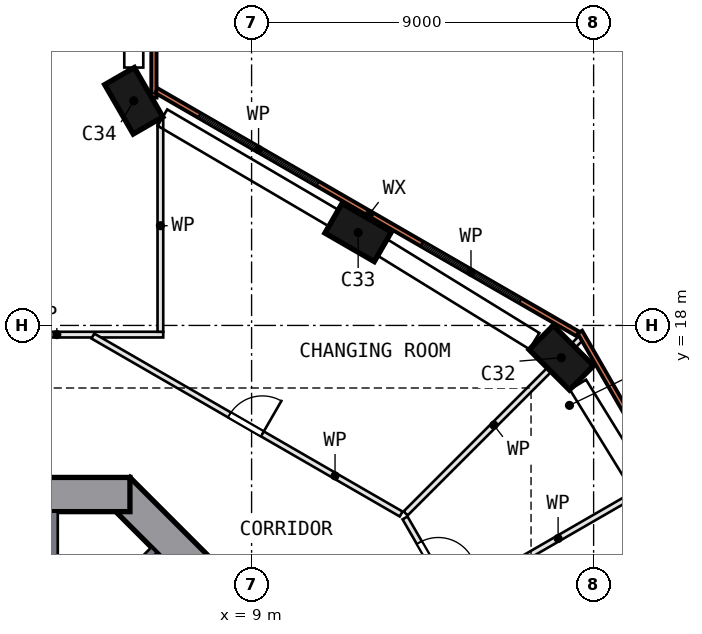
"""IFC4 building model, lengths in metres.
Left out: names, types, materials, properties, quantities, classifications, styles, units other than length and angle.
Written with IfcOpenShell. Run it as: python <this file> out.ifc"""

import sys

from ifc_helpers import new_model, si_unit, direction, frame, frame_2d, origin, origin_2d, place, context, subcontext, project, spatial, polyline, rectangle, outline, extrude, element, fill, save


model = new_model("IFC4")
c1 = context("Model", 3, precision=1e-05, world=origin(), true_north=direction((0.0, 1.0)))
c2 = subcontext(c1, "Body", "Model", "MODEL_VIEW")
j1 = project(units=[si_unit("LENGTHUNIT", "METRE"), si_unit("PLANEANGLEUNIT", "RADIAN")], contexts=[c1])
p1 = place(None, origin())
s1 = spatial("IfcSite", under=j1, at=p1, CompositionType="ELEMENT")
p2 = place(p1, origin())
s2 = spatial("IfcBuilding", under=s1, at=p2, CompositionType="ELEMENT")
p3 = place(p2, frame((0.0, 0.0, 23.5)))
s3 = spatial("IfcBuildingStorey", under=s2, at=p3, CompositionType="ELEMENT", Elevation=23.5)
for number, where, z_axis, x_axis in (
    (1, (17.151, 17.151, 0.0), (0.0, 0.0, 1.0), (0.707, -0.707, 0.0)),
    (2, (11.804, 20.445, 0.0), (0.0, 0.0, 1.0), (-0.866, 0.5, 0.0)),
    (3, (5.9, 23.912, 0.0), (0.0, 0.0, 1.0), (0.5, -0.866, 0.0)),
):
    element("IfcColumn", number, at=place(p3, frame(where, z_axis=z_axis, x_axis=x_axis)), inside=s3, PredefinedType="COLUMN", context=c2, shape_type="SweptSolid", body=[
        extrude(rectangle(XDim=1.5, YDim=0.9, at=origin_2d()), origin(), (0.0, 0.0, 1.0), 4.0),
    ])
p4 = place(p3, frame((13.682, 5.481, 0.0), z_axis=(0.0, 0.0, 1.0), x_axis=(-0.707106781, 0.707106781, 0.0)))
e4 = element("IfcWall", 4, at=p4, inside=s3, PredefinedType="SHEAR", context=c2, shape_type="SweptSolid", body=[
    extrude(rectangle(XDim=11.598, YDim=0.9, at=frame_2d((5.799, 0.0))), origin(), (0.0, 0.0, 1.0), 4.5),
])
p5 = place(p4, frame((2.099, 0.0, 0.0)))
e5 = element("IfcOpeningElement", 5, at=p5, cuts=e4, PredefinedType="OPENING", context=c2, shape_type="SweptSolid", body=[
    extrude(rectangle(XDim=1.2, YDim=2.1, at=frame_2d((0.6, 1.05))), frame((0.0, 0.46, 0.0), z_axis=(0.0, -1.0, 0.0), x_axis=(1.0, 0.0, 0.0)), (0.0, 0.0, 1.0), 0.92),
])
p6 = place(p3, frame((5.799, 13.55, 0.0), z_axis=(0.0, 0.0, 1.0), x_axis=(-1.0, 0.0, 0.0)))
e6 = element("IfcWall", 6, at=p6, inside=s3, PredefinedType="SHEAR", context=c2, shape_type="SweptSolid", body=[
    extrude(rectangle(XDim=11.598, YDim=0.9, at=frame_2d((5.799, 0.0))), origin(), (0.0, 0.0, 1.0), 4.5),
])
p7 = place(p6, frame((4.899, 0.0, 0.0)))
e7 = element("IfcOpeningElement", 7, at=p7, cuts=e6, PredefinedType="OPENING", context=c2, shape_type="SweptSolid", body=[
    extrude(rectangle(XDim=1.8, YDim=2.1, at=frame_2d((0.9, 1.05))), frame((0.0, 0.46, 0.0), z_axis=(0.0, -1.0, 0.0), x_axis=(1.0, 0.0, 0.0)), (0.0, 0.0, 1.0), 0.92),
])
p8 = place(p3, frame((6.43, 23.995, 0.0), z_axis=(0.0, 0.0, 1.0), x_axis=(0.0, 1.0, 0.0)))
e8 = element("IfcWall", 8, at=p8, inside=s3, PredefinedType="SOLIDWALL", context=c2, shape_type="SweptSolid", body=[
    extrude(rectangle(XDim=17.405, YDim=0.14, at=frame_2d((8.702, 0.0))), origin(), (0.0, 0.0, 1.0), 4.0),
])
p9 = place(p8, frame((1.634, 0.0, 0.9)))
e9 = element("IfcOpeningElement", 9, at=p9, cuts=e8, PredefinedType="OPENING", context=c2, shape_type="SweptSolid", body=[
    extrude(rectangle(XDim=3.0, YDim=2.4, at=frame_2d((1.5, 1.2))), frame((0.0, 0.08, 0.0), z_axis=(0.0, -1.0, 0.0), x_axis=(1.0, 0.0, 0.0)), (0.0, 0.0, 1.0), 0.16),
])
p10 = place(p8, frame((7.334, 0.0, 0.9)))
e10 = element("IfcOpeningElement", 10, at=p10, cuts=e8, PredefinedType="OPENING", context=c2, shape_type="SweptSolid", body=[
    extrude(rectangle(XDim=3.0, YDim=2.4, at=frame_2d((1.5, 1.2))), frame((0.0, 0.08, 0.0), z_axis=(0.0, -1.0, 0.0), x_axis=(1.0, 0.0, 0.0)), (0.0, 0.0, 1.0), 0.16),
])
p11 = place(p3, frame((24.118, 6.603, 0.0), z_axis=(0.0, 0.0, 1.0), x_axis=(-0.499997984, 0.866026568, 0.0)))
e11 = element("IfcWall", 11, at=p11, inside=s3, PredefinedType="SOLIDWALL", context=c2, shape_type="SweptSolid", body=[
    extrude(rectangle(XDim=12.962, YDim=0.14, at=frame_2d((6.481, 0.0))), origin(), (0.0, 0.0, 1.0), 4.0),
])
p12 = place(p3, frame((17.586, 17.777, 0.0), z_axis=(0.0, 0.0, 1.0), x_axis=(-0.866023287, 0.500003667, 0.0)))
e12 = element("IfcWall", 12, at=p12, inside=s3, PredefinedType="SOLIDWALL", context=c2, shape_type="SweptSolid", body=[
    extrude(rectangle(XDim=12.801, YDim=0.14, at=frame_2d((6.4, 0.0))), origin(), (0.0, 0.0, 1.0), 4.0),
])
p13 = place(p12, frame((1.748, 0.0, 0.9)))
e13 = element("IfcOpeningElement", 13, at=p13, cuts=e12, PredefinedType="OPENING", context=c2, shape_type="SweptSolid", body=[
    extrude(rectangle(XDim=3.0, YDim=2.4, at=frame_2d((1.5, 1.2))), frame((0.0, 0.08, 0.0), z_axis=(0.0, -1.0, 0.0), x_axis=(1.0, 0.0, 0.0)), (0.0, 0.0, 1.0), 0.16),
])
p14 = place(p12, frame((7.902, 0.0, 0.9)))
e14 = element("IfcOpeningElement", 14, at=p14, cuts=e12, PredefinedType="OPENING", context=c2, shape_type="SweptSolid", body=[
    extrude(rectangle(XDim=3.6, YDim=2.4, at=frame_2d((1.8, 1.2))), frame((0.0, 0.08, 0.0), z_axis=(0.0, -1.0, 0.0), x_axis=(1.0, 0.0, 0.0)), (0.0, 0.0, 1.0), 0.16),
])
p15 = place(p3, origin())
e15 = element("IfcWall", 15, at=p15, inside=s3, PredefinedType="SOLIDWALL", context=c2, shape_type="SweptSolid", body=[
    extrude(outline(polyline([(3.9, 13.1), (3.9, 10.9), (3.7, 10.9), (3.7, 12.9), (1.4, 12.9), (1.4, 10.9), (1.2, 10.9), (1.2, 13.1), (3.9, 13.1)])), origin(), (0.0, 0.0, 1.0), 4.0),
])
p16 = place(p3, frame((3.677, 9.334, 0.0), z_axis=(0.0, 0.0, 1.0), x_axis=(0.707106781, 0.707106781, 0.0)))
e16 = element("IfcWall", 16, at=p16, inside=s3, PredefinedType="SOLIDWALL", context=c2, shape_type="SweptSolid", body=[
    extrude(rectangle(XDim=3.9, YDim=0.2, at=frame_2d((1.95, 0.0))), origin(), (0.0, 0.0, 1.0), 4.0),
])
p17 = place(p3, frame((6.675, 17.758, 0.0), z_axis=(0.0, 0.0, 1.0), x_axis=(-1.0, 0.0, 0.0)))
e17 = element("IfcWall", 17, at=p17, inside=s3, PredefinedType="PARTITIONING", context=c2, shape_type="SweptSolid", body=[
    extrude(rectangle(XDim=13.35, YDim=0.15, at=frame_2d((6.675, 0.0))), origin(), (0.0, 0.0, 1.0), 4.0),
])
p18 = place(p17, frame((5.8, 0.0, 0.0)))
e18 = element("IfcOpeningElement", 18, at=p18, cuts=e17, PredefinedType="OPENING", context=c2, shape_type="SweptSolid", body=[
    extrude(rectangle(XDim=1.8, YDim=2.1, at=frame_2d((0.9, 1.05))), frame((0.0, 0.085, 0.0), z_axis=(0.0, -1.0, 0.0), x_axis=(1.0, 0.0, 0.0)), (0.0, 0.0, 1.0), 0.17),
])
p19 = place(p3, frame((4.823, 17.721, 0.0), z_axis=(0.0, 0.0, 1.0), x_axis=(0.866037142, -0.499979668, 0.0)))
e19 = element("IfcWall", 19, at=p19, inside=s3, PredefinedType="PARTITIONING", context=c2, shape_type="SweptSolid", body=[
    extrude(rectangle(XDim=9.367, YDim=0.15, at=frame_2d((4.683, 0.0))), origin(), (0.0, 0.0, 1.0), 4.0),
])
p20 = place(p19, frame((4.15, 0.0, 0.0)))
e20 = element("IfcOpeningElement", 20, at=p20, cuts=e19, PredefinedType="OPENING", context=c2, shape_type="SweptSolid", body=[
    extrude(rectangle(XDim=1.0, YDim=2.1, at=frame_2d((0.5, 1.05))), frame((0.0, 0.085, 0.0), z_axis=(0.0, -1.0, 0.0), x_axis=(1.0, 0.0, 0.0)), (0.0, 0.0, 1.0), 0.17),
])
p21 = place(p3, frame((6.6, 17.833, 0.0), z_axis=(0.0, 0.0, 1.0), x_axis=(0.0, 1.0, 0.0)))
e21 = element("IfcWall", 21, at=p21, inside=s3, PredefinedType="PARTITIONING", context=c2, shape_type="SweptSolid", body=[
    extrude(rectangle(XDim=5.582, YDim=0.15, at=frame_2d((2.791, 0.0))), origin(), (0.0, 0.0, 1.0), 4.0),
])
p22 = place(p3, frame((13.038, 12.935, 0.0), z_axis=(0.0, 0.0, 1.0), x_axis=(0.499933044, -0.866064057, 0.0)))
e22 = element("IfcWall", 22, at=p22, inside=s3, PredefinedType="PARTITIONING", context=c2, shape_type="SweptSolid", body=[
    extrude(rectangle(XDim=2.408, YDim=0.15, at=frame_2d((1.204, 0.0))), origin(), (0.0, 0.0, 1.0), 4.0),
])
p23 = place(p22, frame((0.75, 0.0, 0.0)))
e23 = element("IfcOpeningElement", 23, at=p23, cuts=e22, PredefinedType="OPENING", context=c2, shape_type="SweptSolid", body=[
    extrude(rectangle(XDim=1.0, YDim=2.1, at=frame_2d((0.5, 1.05))), frame((0.0, 0.085, 0.0), z_axis=(0.0, -1.0, 0.0), x_axis=(1.0, 0.0, 0.0)), (0.0, 0.0, 1.0), 0.17),
])
p24 = place(p3, frame((17.7, 17.7, 0.0), z_axis=(0.0, 0.0, 1.0), x_axis=(-0.707106781, -0.707106781, 0.0)))
e24 = element("IfcWall", 24, at=p24, inside=s3, PredefinedType="PARTITIONING", context=c2, shape_type="SweptSolid", body=[
    extrude(rectangle(XDim=6.572, YDim=0.15, at=frame_2d((3.286, 0.0))), origin(), (0.0, 0.0, 1.0), 4.0),
])
p25 = place(p3, frame((19.787, 13.964, 0.0), z_axis=(0.0, 0.0, 1.0), x_axis=(-0.866042631, -0.49997016, 0.0)))
e25 = element("IfcWall", 25, at=p25, inside=s3, PredefinedType="PARTITIONING", context=c2, shape_type="SweptSolid", body=[
    extrude(rectangle(XDim=6.285, YDim=0.15, at=frame_2d((3.143, 0.0))), origin(), (0.0, 0.0, 1.0), 4.0),
])
p26 = place(p13, origin())
e26 = element("IfcWindow", 26, at=p26, inside=s3, PartitioningType="SINGLE_PANEL", PredefinedType="WINDOW", context=c2, shape_type="SweptSolid", body=[
    extrude(rectangle(XDim=3.0, YDim=2.4, at=frame_2d((1.5, 1.2))), frame((0.0, 0.03, 0.0), z_axis=(0.0, -1.0, 0.0), x_axis=(1.0, 0.0, 0.0)), (0.0, 0.0, 1.0), 0.06),
])
fill(e13, e26)
p27 = place(p14, origin())
e27 = element("IfcWindow", 27, at=p27, inside=s3, PartitioningType="SINGLE_PANEL", PredefinedType="WINDOW", context=c2, shape_type="SweptSolid", body=[
    extrude(rectangle(XDim=3.6, YDim=2.4, at=frame_2d((1.8, 1.2))), frame((0.0, 0.03, 0.0), z_axis=(0.0, -1.0, 0.0), x_axis=(1.0, 0.0, 0.0)), (0.0, 0.0, 1.0), 0.06),
])
fill(e14, e27)
p28 = place(p20, origin())
e28 = element("IfcDoor", 28, at=p28, inside=s3, OperationType="SINGLE_SWING_RIGHT", PredefinedType="DOOR", context=c2, shape_type="SweptSolid", body=[
    extrude(rectangle(XDim=1.0, YDim=2.1, at=frame_2d((0.5, 1.05))), frame((0.0, 0.025, 0.0), z_axis=(0.0, -1.0, 0.0), x_axis=(1.0, 0.0, 0.0)), (0.0, 0.0, 1.0), 0.05),
])
fill(e20, e28)
p29 = place(p23, origin())
e29 = element("IfcDoor", 29, at=p29, inside=s3, OperationType="SINGLE_SWING_RIGHT", PredefinedType="DOOR", context=c2, shape_type="SweptSolid", body=[
    extrude(rectangle(XDim=1.0, YDim=2.1, at=frame_2d((0.5, 1.05))), frame((0.0, 0.025, 0.0), z_axis=(0.0, -1.0, 0.0), x_axis=(1.0, 0.0, 0.0)), (0.0, 0.0, 1.0), 0.05),
])
fill(e23, e29)
save(model, sys.argv[1])
